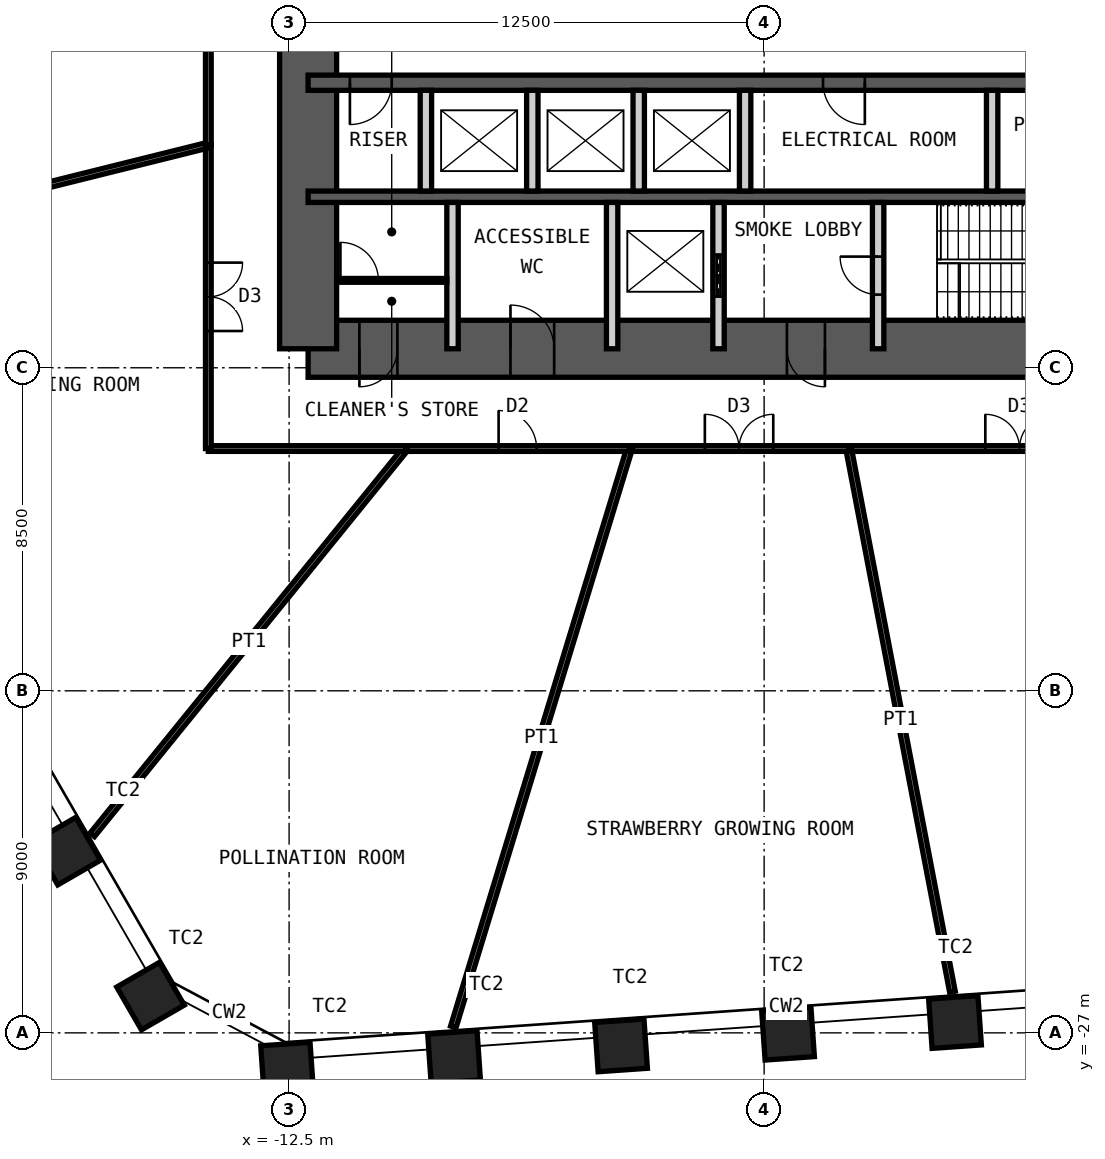
"""IFC4 building model, lengths in metres.
Left out: names, types, materials, properties, quantities, classifications, styles, units other than length and angle.
Written with IfcOpenShell. Run it as: python <this file> out.ifc"""

import sys

from ifc_helpers import new_model, si_unit, direction, frame, frame_2d, origin, origin_2d, place, context, subcontext, project, spatial, rectangle, hollow_rectangle, extrude, element, fill, save


model = new_model("IFC4")
c1 = context("Model", 3, precision=1e-05, world=origin(), true_north=direction((0.0, 1.0)))
c2 = subcontext(c1, "Body", "Model", "MODEL_VIEW")
j1 = project(units=[si_unit("LENGTHUNIT", "METRE"), si_unit("PLANEANGLEUNIT", "RADIAN")], contexts=[c1])
p1 = place(None, origin())
s1 = spatial("IfcSite", under=j1, at=p1, CompositionType="ELEMENT")
p2 = place(p1, origin())
s2 = spatial("IfcBuilding", under=s1, at=p2, CompositionType="ELEMENT")
p3 = place(p2, frame((0.0, 0.0, 77.0)))
s3 = spatial("IfcBuildingStorey", under=s2, at=p3, CompositionType="ELEMENT", Elevation=77.0)
for number, where, z_axis, x_axis in (
    (1, (5.023, -26.715, 0.0), (0.0, 0.0, 1.0), (0.998, 0.07, 0.0)),
    (2, (0.629, -27.022, 0.0), (0.0, 0.0, 1.0), (0.998, 0.07, 0.0)),
    (3, (-3.765, -27.329, 0.0), (0.0, 0.0, 1.0), (0.998, 0.07, 0.0)),
    (4, (-8.159, -27.636, 0.0), (0.0, 0.0, 1.0), (0.998, 0.07, 0.0)),
    (5, (-12.553, -27.944, 0.0), (0.0, 0.0, 1.0), (0.998, 0.07, 0.0)),
    (6, (-16.147, -26.033, 0.0), (0.0, 0.0, 1.0), (0.5, -0.866, 0.0)),
    (7, (-18.349, -22.218, 0.0), (0.0, 0.0, 1.0), (0.5, -0.866, 0.0)),
):
    element("IfcColumn", number, at=place(p3, frame(where, z_axis=z_axis, x_axis=x_axis)), inside=s3, PredefinedType="COLUMN", context=c2, shape_type="SweptSolid", body=[
        extrude(hollow_rectangle(XDim=1.3, YDim=1.3, WallThickness=0.1, at=origin_2d()), origin(), (0.0, 0.0, 1.0), 5.0),
    ])
p4 = place(p3, frame((-12.0, -9.0, 0.0), z_axis=(0.0, 0.0, 1.0), x_axis=(1.0, 0.0, 0.0)))
e8 = element("IfcWall", 8, at=p4, inside=s3, PredefinedType="SHEAR", context=c2, shape_type="SweptSolid", body=[
    extrude(rectangle(XDim=24.0, YDim=1.5, at=frame_2d((12.0, 0.0))), origin(), (0.0, 0.0, 1.0), 5.0),
])
p5 = place(p4, frame((1.35, 0.0, 0.0)))
e9 = element("IfcOpeningElement", 9, at=p5, cuts=e8, PredefinedType="OPENING", context=c2, shape_type="SweptSolid", body=[
    extrude(rectangle(XDim=1.0, YDim=2.1, at=frame_2d((0.5, 1.05))), frame((0.0, 0.76, 0.0), z_axis=(0.0, -1.0, 0.0), x_axis=(1.0, 0.0, 0.0)), (0.0, 0.0, 1.0), 1.52),
])
p6 = place(p4, frame((5.325, 0.0, 0.0)))
e10 = element("IfcOpeningElement", 10, at=p6, cuts=e8, PredefinedType="OPENING", context=c2, shape_type="SweptSolid", body=[
    extrude(rectangle(XDim=1.15, YDim=2.1, at=frame_2d((0.575, 1.05))), frame((0.0, 0.76, 0.0), z_axis=(0.0, -1.0, 0.0), x_axis=(1.0, 0.0, 0.0)), (0.0, 0.0, 1.0), 1.52),
])
p7 = place(p4, frame((12.6, 0.0, 0.0)))
e11 = element("IfcOpeningElement", 11, at=p7, cuts=e8, PredefinedType="OPENING", context=c2, shape_type="SweptSolid", body=[
    extrude(rectangle(XDim=1.0, YDim=2.1, at=frame_2d((0.5, 1.05))), frame((0.0, 0.76, 0.0), z_axis=(0.0, -1.0, 0.0), x_axis=(1.0, 0.0, 0.0)), (0.0, 0.0, 1.0), 1.52),
])
p8 = place(p3, frame((-12.0, -9.0, 0.0), z_axis=(0.0, 0.0, 1.0), x_axis=(0.0, 1.0, 0.0)))
e12 = element("IfcWall", 12, at=p8, inside=s3, PredefinedType="SHEAR", context=c2, shape_type="SweptSolid", body=[
    extrude(rectangle(XDim=18.0, YDim=1.5, at=frame_2d((9.0, 0.0))), origin(), (0.0, 0.0, 1.0), 5.0),
])
p9 = place(p8, frame((8.1, 0.0, 0.0)))
e13 = element("IfcOpeningElement", 13, at=p9, cuts=e12, PredefinedType="OPENING", context=c2, shape_type="SweptSolid", body=[
    extrude(rectangle(XDim=1.8, YDim=2.1, at=frame_2d((0.9, 1.05))), frame((0.0, 0.76, 0.0), z_axis=(0.0, -1.0, 0.0), x_axis=(1.0, 0.0, 0.0)), (0.0, 0.0, 1.0), 1.52),
])
p10 = place(p3, frame((-12.0, -2.0, 0.0), z_axis=(0.0, 0.0, 1.0), x_axis=(1.0, 0.0, 0.0)))
e14 = element("IfcWall", 14, at=p10, inside=s3, PredefinedType="SHEAR", context=c2, shape_type="SweptSolid", body=[
    extrude(rectangle(XDim=24.0, YDim=0.4, at=frame_2d((12.0, 0.0))), origin(), (0.0, 0.0, 1.0), 5.0),
])
p11 = place(p10, frame((1.1, 0.0, 0.0)))
e15 = element("IfcOpeningElement", 15, at=p11, cuts=e14, PredefinedType="OPENING", context=c2, shape_type="SweptSolid", body=[
    extrude(rectangle(XDim=1.1, YDim=2.1, at=frame_2d((0.55, 1.05))), frame((0.0, 0.21, 0.0), z_axis=(0.0, -1.0, 0.0), x_axis=(1.0, 0.0, 0.0)), (0.0, 0.0, 1.0), 0.42),
])
p12 = place(p10, frame((13.55, 0.0, 0.0)))
e16 = element("IfcOpeningElement", 16, at=p12, cuts=e14, PredefinedType="OPENING", context=c2, shape_type="SweptSolid", body=[
    extrude(rectangle(XDim=1.1, YDim=2.1, at=frame_2d((0.55, 1.05))), frame((0.0, 0.21, 0.0), z_axis=(0.0, -1.0, 0.0), x_axis=(1.0, 0.0, 0.0)), (0.0, 0.0, 1.0), 0.42),
])
p13 = place(p10, frame((20.7, 0.0, 0.0)))
e17 = element("IfcOpeningElement", 17, at=p13, cuts=e14, PredefinedType="OPENING", context=c2, shape_type="SweptSolid", body=[
    extrude(rectangle(XDim=1.1, YDim=2.1, at=frame_2d((0.55, 1.05))), frame((0.0, 0.21, 0.0), z_axis=(0.0, -1.0, 0.0), x_axis=(1.0, 0.0, 0.0)), (0.0, 0.0, 1.0), 0.42),
])
p14 = place(p3, frame((-12.0, -5.0, 0.0), z_axis=(0.0, 0.0, 1.0), x_axis=(1.0, 0.0, 0.0)))
e18 = element("IfcWall", 18, at=p14, inside=s3, PredefinedType="SHEAR", context=c2, shape_type="SweptSolid", body=[
    extrude(rectangle(XDim=24.0, YDim=0.3, at=frame_2d((12.0, 0.0))), origin(), (0.0, 0.0, 1.0), 5.0),
])
for number, where, z_axis, x_axis in (
    (19, (-8.9, -4.85, 0.0), (0.0, 0.0, 1.0), (0.0, 1.0, 0.0)),
    (20, (-6.1, -4.85, 0.0), (0.0, 0.0, 1.0), (0.0, 1.0, 0.0)),
    (21, (-3.3, -4.85, 0.0), (0.0, 0.0, 1.0), (0.0, 1.0, 0.0)),
    (22, (-0.5, -4.85, 0.0), (0.0, 0.0, 1.0), (0.0, 1.0, 0.0)),
    (23, (6.0, -4.85, 0.0), (0.0, 0.0, 1.0), (0.0, 1.0, 0.0)),
):
    element("IfcWall", number, at=place(p3, frame(where, z_axis=z_axis, x_axis=x_axis)), inside=s3, PredefinedType="PARTITIONING", context=c2, shape_type="SweptSolid", body=[
        extrude(rectangle(XDim=2.65, YDim=0.3, at=frame_2d((1.325, 0.0))), origin(), (0.0, 0.0, 1.0), 4.78),
    ])
for number, where, z_axis, x_axis in (
    (24, (-8.2, -9.0, 0.0), (0.0, 0.0, 1.0), (0.0, 1.0, 0.0)),
    (25, (-4.0, -9.0, 0.0), (0.0, 0.0, 1.0), (0.0, 1.0, 0.0)),
):
    element("IfcWall", number, at=place(p3, frame(where, z_axis=z_axis, x_axis=x_axis)), inside=s3, PredefinedType="PARTITIONING", context=c2, shape_type="SweptSolid", body=[
        extrude(rectangle(XDim=3.85, YDim=0.3, at=frame_2d((1.925, 0.0))), origin(), (0.0, 0.0, 1.0), 4.78),
    ])
p15 = place(p3, frame((-1.2, -9.0, 0.0), z_axis=(0.0, 0.0, 1.0), x_axis=(0.0, 1.0, 0.0)))
e26 = element("IfcWall", 26, at=p15, inside=s3, PredefinedType="PARTITIONING", context=c2, shape_type="SweptSolid", body=[
    extrude(rectangle(XDim=3.85, YDim=0.3, at=frame_2d((1.925, 0.0))), origin(), (0.0, 0.0, 1.0), 4.78),
])
p16 = place(p15, frame((1.375, 0.0, 0.0)))
e27 = element("IfcOpeningElement", 27, at=p16, cuts=e26, PredefinedType="OPENING", context=c2, shape_type="SweptSolid", body=[
    extrude(rectangle(XDim=1.1, YDim=2.4, at=frame_2d((0.55, 1.2))), frame((0.0, 0.16, 0.0), z_axis=(0.0, -1.0, 0.0), x_axis=(1.0, 0.0, 0.0)), (0.0, 0.0, 1.0), 0.32),
])
p17 = place(p3, frame((3.0, -9.0, 0.0), z_axis=(0.0, 0.0, 1.0), x_axis=(0.0, 1.0, 0.0)))
e28 = element("IfcWall", 28, at=p17, inside=s3, PredefinedType="PARTITIONING", context=c2, shape_type="SweptSolid", body=[
    extrude(rectangle(XDim=3.85, YDim=0.3, at=frame_2d((1.925, 0.0))), origin(), (0.0, 0.0, 1.0), 4.78),
])
p18 = place(p17, frame((1.425, 0.0, 0.0)))
e29 = element("IfcOpeningElement", 29, at=p18, cuts=e28, PredefinedType="OPENING", context=c2, shape_type="SweptSolid", body=[
    extrude(rectangle(XDim=1.0, YDim=2.1, at=frame_2d((0.5, 1.05))), frame((0.0, 0.16, 0.0), z_axis=(0.0, -1.0, 0.0), x_axis=(1.0, 0.0, 0.0)), (0.0, 0.0, 1.0), 0.32),
])
p19 = place(p3, frame((-11.25, -7.2, 0.0), z_axis=(0.0, 0.0, 1.0), x_axis=(1.0, 0.0, 0.0)))
e30 = element("IfcWall", 30, at=p19, inside=s3, PredefinedType="PARTITIONING", context=c2, shape_type="SweptSolid", body=[
    extrude(rectangle(XDim=2.9, YDim=0.1, at=frame_2d((1.45, 0.0))), origin(), (0.0, 0.0, 1.0), 4.78),
])
p20 = place(p19, frame((0.1, 0.0, 0.0)))
e31 = element("IfcOpeningElement", 31, at=p20, cuts=e30, PredefinedType="OPENING", context=c2, shape_type="SweptSolid", body=[
    extrude(rectangle(XDim=1.0, YDim=2.4, at=frame_2d((0.5, 1.2))), frame((0.0, 0.06, 0.0), z_axis=(0.0, -1.0, 0.0), x_axis=(1.0, 0.0, 0.0)), (0.0, 0.0, 1.0), 0.12),
])
p21 = place(p3, frame((11.218, -11.625, 0.0), z_axis=(0.0, 0.0, 1.0), x_axis=(-1.0, 0.0, 0.0)))
e32 = element("IfcWall", 32, at=p21, inside=s3, PredefinedType="PARTITIONING", context=c2, shape_type="SweptSolid", body=[
    extrude(rectangle(XDim=8.996, YDim=0.15, at=frame_2d((4.498, 0.0))), origin(), (0.0, 0.0, 1.0), 4.8),
])
p22 = place(p21, frame((3.598, 0.0, 0.0)))
e33 = element("IfcOpeningElement", 33, at=p22, cuts=e32, PredefinedType="OPENING", context=c2, shape_type="SweptSolid", body=[
    extrude(rectangle(XDim=1.8, YDim=2.4, at=frame_2d((0.9, 1.2))), frame((0.0, 0.085, 0.0), z_axis=(0.0, -1.0, 0.0), x_axis=(1.0, 0.0, 0.0)), (0.0, 0.0, 1.0), 0.17),
])
p23 = place(p3, frame((4.955, -25.918, 0.0), z_axis=(0.0, 0.0, 1.0), x_axis=(-0.187785090129, 0.98221014041, 0.0)))
e34 = element("IfcWall", 34, at=p23, inside=s3, PredefinedType="PARTITIONING", context=c2, shape_type="SweptSolid", body=[
    extrude(rectangle(XDim=14.552, YDim=0.15, at=frame_2d((7.276, 0.0))), origin(), (0.0, 0.0, 1.0), 3.7),
])
p24 = place(p3, frame((2.222, -11.625, 0.0), z_axis=(0.0, 0.0, 1.0), x_axis=(-1.0, 0.0, 0.0)))
e35 = element("IfcWall", 35, at=p24, inside=s3, PredefinedType="PARTITIONING", context=c2, shape_type="SweptSolid", body=[
    extrude(rectangle(XDim=5.764, YDim=0.15, at=frame_2d((2.882, 0.0))), origin(), (0.0, 0.0, 1.0), 4.8),
])
p25 = place(p24, frame((1.982, 0.0, 0.0)))
e36 = element("IfcOpeningElement", 36, at=p25, cuts=e35, PredefinedType="OPENING", context=c2, shape_type="SweptSolid", body=[
    extrude(rectangle(XDim=1.8, YDim=2.4, at=frame_2d((0.9, 1.2))), frame((0.0, 0.085, 0.0), z_axis=(0.0, -1.0, 0.0), x_axis=(1.0, 0.0, 0.0)), (0.0, 0.0, 1.0), 0.17),
])
p26 = place(p3, frame((-8.179, -26.843, 0.0), z_axis=(0.0, 0.0, 1.0), x_axis=(0.291466333136, 0.956581087336, 0.0)))
e37 = element("IfcWall", 37, at=p26, inside=s3, PredefinedType="PARTITIONING", context=c2, shape_type="SweptSolid", body=[
    extrude(rectangle(XDim=15.908, YDim=0.15, at=frame_2d((7.954, 0.0))), origin(), (0.0, 0.0, 1.0), 3.7),
])
p27 = place(p3, frame((-3.542, -11.625, 0.0), z_axis=(0.0, 0.0, 1.0), x_axis=(-1.0, 0.0, 0.0)))
e38 = element("IfcWall", 38, at=p27, inside=s3, PredefinedType="PARTITIONING", context=c2, shape_type="SweptSolid", body=[
    extrude(rectangle(XDim=5.89, YDim=0.15, at=frame_2d((2.945, 0.0))), origin(), (0.0, 0.0, 1.0), 4.8),
])
p28 = place(p27, frame((2.445, 0.0, 0.0)))
e39 = element("IfcOpeningElement", 39, at=p28, cuts=e38, PredefinedType="OPENING", context=c2, shape_type="SweptSolid", body=[
    extrude(rectangle(XDim=1.0, YDim=2.4, at=frame_2d((0.5, 1.2))), frame((0.0, 0.085, 0.0), z_axis=(0.0, -1.0, 0.0), x_axis=(1.0, 0.0, 0.0)), (0.0, 0.0, 1.0), 0.17),
])
p29 = place(p3, frame((-17.68, -21.791, 0.0), z_axis=(0.0, 0.0, 1.0), x_axis=(0.630054650118, 0.776550795418, 0.0)))
e40 = element("IfcWall", 40, at=p29, inside=s3, PredefinedType="PARTITIONING", context=c2, shape_type="SweptSolid", body=[
    extrude(rectangle(XDim=13.091, YDim=0.15, at=frame_2d((6.545, 0.0))), origin(), (0.0, 0.0, 1.0), 3.7),
])
p30 = place(p3, frame((-9.432, -11.625, 0.0), z_axis=(0.0, 0.0, 1.0), x_axis=(-1.0, 0.0, 0.0)))
e41 = element("IfcWall", 41, at=p30, inside=s3, PredefinedType="PARTITIONING", context=c2, shape_type="SweptSolid", body=[
    extrude(rectangle(XDim=5.193, YDim=0.15, at=frame_2d((2.596, 0.0))), origin(), (0.0, 0.0, 1.0), 4.8),
])
p31 = place(p3, frame((-14.625, -11.625, 0.0), z_axis=(0.0, 0.0, 1.0), x_axis=(0.0, 1.0, 0.0)))
e42 = element("IfcWall", 42, at=p31, inside=s3, PredefinedType="PARTITIONING", context=c2, shape_type="SweptSolid", body=[
    extrude(rectangle(XDim=7.984, YDim=0.15, at=frame_2d((3.992, 0.0))), origin(), (0.0, 0.0, 1.0), 4.8),
])
p32 = place(p31, frame((3.092, 0.0, 0.0)))
e43 = element("IfcOpeningElement", 43, at=p32, cuts=e42, PredefinedType="OPENING", context=c2, shape_type="SweptSolid", body=[
    extrude(rectangle(XDim=1.8, YDim=2.4, at=frame_2d((0.9, 1.2))), frame((0.0, 0.085, 0.0), z_axis=(0.0, -1.0, 0.0), x_axis=(1.0, 0.0, 0.0)), (0.0, 0.0, 1.0), 0.17),
])
p33 = place(p3, frame((-26.455, -6.586, 0.0), z_axis=(0.0, 0.0, 1.0), x_axis=(0.970383505188, 0.241569561118, 0.0)))
e44 = element("IfcWall", 44, at=p33, inside=s3, PredefinedType="PARTITIONING", context=c2, shape_type="SweptSolid", body=[
    extrude(rectangle(XDim=12.191, YDim=0.15, at=frame_2d((6.096, 0.0))), origin(), (0.0, 0.0, 1.0), 3.7),
])
p34 = place(p3, frame((-14.625, -3.641, 0.0), z_axis=(0.0, 0.0, 1.0), x_axis=(0.0, 1.0, 0.0)))
e45 = element("IfcWall", 45, at=p34, inside=s3, PredefinedType="PARTITIONING", context=c2, shape_type="SweptSolid", body=[
    extrude(rectangle(XDim=11.66, YDim=0.15, at=frame_2d((5.83, 0.0))), origin(), (0.0, 0.0, 1.0), 4.8),
])
p35 = place(p34, frame((4.93, 0.0, 0.0)))
e46 = element("IfcOpeningElement", 46, at=p35, cuts=e45, PredefinedType="OPENING", context=c2, shape_type="SweptSolid", body=[
    extrude(rectangle(XDim=1.8, YDim=2.4, at=frame_2d((0.9, 1.2))), frame((0.0, 0.085, 0.0), z_axis=(0.0, -1.0, 0.0), x_axis=(1.0, 0.0, 0.0)), (0.0, 0.0, 1.0), 0.17),
])
p36 = place(p5, origin())
e47 = element("IfcDoor", 47, at=p36, inside=s3, OperationType="SINGLE_SWING_LEFT", PredefinedType="DOOR", context=c2, shape_type="SweptSolid", body=[
    extrude(rectangle(XDim=1.0, YDim=2.1, at=frame_2d((0.5, 1.05))), frame((0.0, 0.025, 0.0), z_axis=(0.0, -1.0, 0.0), x_axis=(1.0, 0.0, 0.0)), (0.0, 0.0, 1.0), 0.05),
])
fill(e9, e47)
p37 = place(p6, origin())
e48 = element("IfcDoor", 48, at=p37, inside=s3, OperationType="SINGLE_SWING_RIGHT", PredefinedType="DOOR", context=c2, shape_type="SweptSolid", body=[
    extrude(rectangle(XDim=1.15, YDim=2.1, at=frame_2d((0.575, 1.05))), frame((0.0, 0.025, 0.0), z_axis=(0.0, -1.0, 0.0), x_axis=(1.0, 0.0, 0.0)), (0.0, 0.0, 1.0), 0.05),
])
fill(e10, e48)
p38 = place(p7, origin())
e49 = element("IfcDoor", 49, at=p38, inside=s3, OperationType="SINGLE_SWING_RIGHT", PredefinedType="DOOR", context=c2, shape_type="SweptSolid", body=[
    extrude(rectangle(XDim=1.0, YDim=2.1, at=frame_2d((0.5, 1.05))), frame((0.0, 0.025, 0.0), z_axis=(0.0, -1.0, 0.0), x_axis=(1.0, 0.0, 0.0)), (0.0, 0.0, 1.0), 0.05),
])
fill(e11, e49)
p39 = place(p18, origin())
e50 = element("IfcDoor", 50, at=p39, inside=s3, OperationType="SINGLE_SWING_LEFT", PredefinedType="DOOR", context=c2, shape_type="SweptSolid", body=[
    extrude(rectangle(XDim=1.0, YDim=2.1, at=frame_2d((0.5, 1.05))), frame((0.0, 0.025, 0.0), z_axis=(0.0, -1.0, 0.0), x_axis=(1.0, 0.0, 0.0)), (0.0, 0.0, 1.0), 0.05),
])
fill(e29, e50)
p40 = place(p11, origin())
e51 = element("IfcDoor", 51, at=p40, inside=s3, OperationType="SINGLE_SWING_LEFT", PredefinedType="DOOR", context=c2, shape_type="SweptSolid", body=[
    extrude(rectangle(XDim=1.1, YDim=2.1, at=frame_2d((0.55, 1.05))), frame((0.0, 0.025, 0.0), z_axis=(0.0, -1.0, 0.0), x_axis=(1.0, 0.0, 0.0)), (0.0, 0.0, 1.0), 0.05),
])
fill(e15, e51)
p41 = place(p12, origin())
e52 = element("IfcDoor", 52, at=p41, inside=s3, OperationType="SINGLE_SWING_RIGHT", PredefinedType="DOOR", context=c2, shape_type="SweptSolid", body=[
    extrude(rectangle(XDim=1.1, YDim=2.1, at=frame_2d((0.55, 1.05))), frame((0.0, 0.025, 0.0), z_axis=(0.0, -1.0, 0.0), x_axis=(1.0, 0.0, 0.0)), (0.0, 0.0, 1.0), 0.05),
])
fill(e16, e52)
p42 = place(p16, origin())
e53 = element("IfcDoor", 53, at=p42, inside=s3, OperationType="DOUBLE_DOOR_SLIDING", PredefinedType="DOOR", context=c2, shape_type="SweptSolid", body=[
    extrude(rectangle(XDim=1.1, YDim=2.4, at=frame_2d((0.55, 1.2))), frame((0.0, 0.025, 0.0), z_axis=(0.0, -1.0, 0.0), x_axis=(1.0, 0.0, 0.0)), (0.0, 0.0, 1.0), 0.05),
])
fill(e27, e53)
p43 = place(p20, origin())
e54 = element("IfcDoor", 54, at=p43, inside=s3, OperationType="SINGLE_SWING_RIGHT", PredefinedType="DOOR", context=c2, shape_type="SweptSolid", body=[
    extrude(rectangle(XDim=1.0, YDim=2.4, at=frame_2d((0.5, 1.2))), frame((0.0, 0.025, 0.0), z_axis=(0.0, -1.0, 0.0), x_axis=(1.0, 0.0, 0.0)), (0.0, 0.0, 1.0), 0.05),
])
fill(e31, e54)
p44 = place(p22, origin())
e55 = element("IfcDoor", 55, at=p44, inside=s3, OperationType="DOUBLE_DOOR_DOUBLE_SWING", PredefinedType="DOOR", context=c2, shape_type="SweptSolid", body=[
    extrude(rectangle(XDim=1.8, YDim=2.4, at=frame_2d((0.9, 1.2))), frame((0.0, 0.025, 0.0), z_axis=(0.0, -1.0, 0.0), x_axis=(1.0, 0.0, 0.0)), (0.0, 0.0, 1.0), 0.05),
])
fill(e33, e55)
p45 = place(p25, origin())
e56 = element("IfcDoor", 56, at=p45, inside=s3, OperationType="DOUBLE_DOOR_DOUBLE_SWING", PredefinedType="DOOR", context=c2, shape_type="SweptSolid", body=[
    extrude(rectangle(XDim=1.8, YDim=2.4, at=frame_2d((0.9, 1.2))), frame((0.0, 0.025, 0.0), z_axis=(0.0, -1.0, 0.0), x_axis=(1.0, 0.0, 0.0)), (0.0, 0.0, 1.0), 0.05),
])
fill(e36, e56)
p46 = place(p28, origin())
e57 = element("IfcDoor", 57, at=p46, inside=s3, OperationType="SINGLE_SWING_RIGHT", PredefinedType="DOOR", context=c2, shape_type="SweptSolid", body=[
    extrude(rectangle(XDim=1.0, YDim=2.4, at=frame_2d((0.5, 1.2))), frame((0.0, 0.025, 0.0), z_axis=(0.0, -1.0, 0.0), x_axis=(1.0, 0.0, 0.0)), (0.0, 0.0, 1.0), 0.05),
])
fill(e39, e57)
p47 = place(p32, origin())
e58 = element("IfcDoor", 58, at=p47, inside=s3, OperationType="DOUBLE_DOOR_DOUBLE_SWING", PredefinedType="DOOR", context=c2, shape_type="SweptSolid", body=[
    extrude(rectangle(XDim=1.8, YDim=2.4, at=frame_2d((0.9, 1.2))), frame((0.0, 0.025, 0.0), z_axis=(0.0, -1.0, 0.0), x_axis=(1.0, 0.0, 0.0)), (0.0, 0.0, 1.0), 0.05),
])
fill(e43, e58)
save(model, sys.argv[1])
